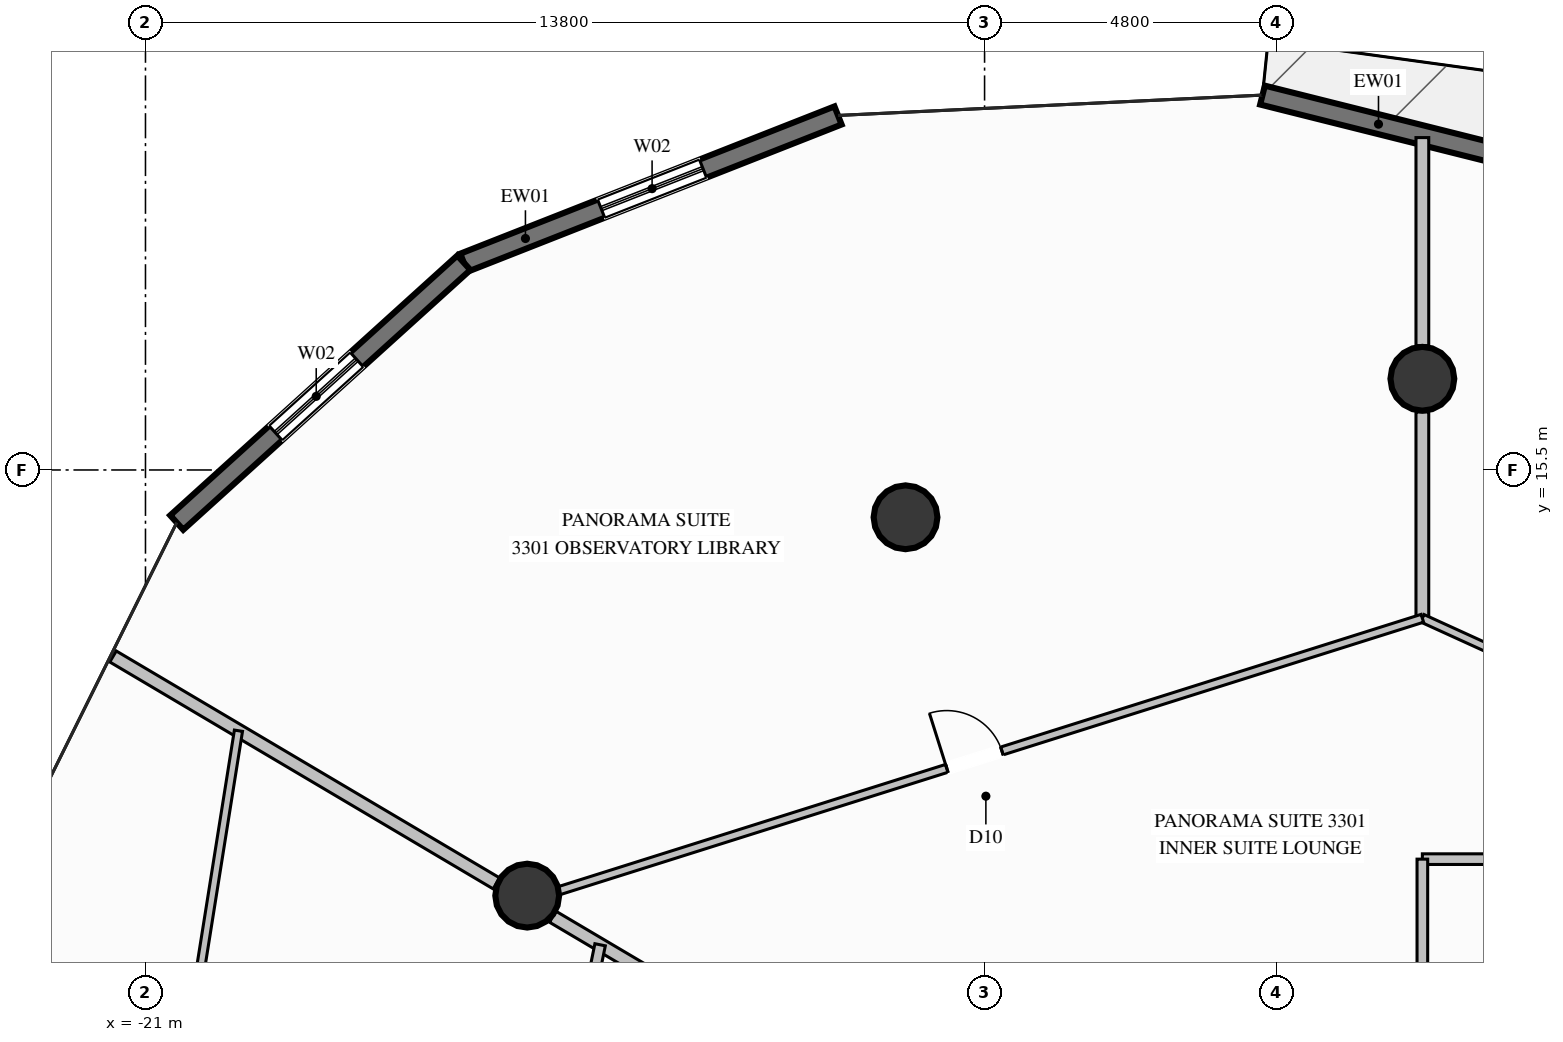
"""IFC4 building model, lengths in metres.
Left out: names, types, materials, properties, quantities, classifications, styles, units other than length and angle.
Written with IfcOpenShell. Run it as: python <this file> out.ifc"""

import sys

from ifc_helpers import new_model, si_unit, direction, frame, frame_2d, origin, origin_2d, place, context, subcontext, project, spatial, rectangle, circle, extrude, element, fill, save


model = new_model("IFC4")
c1 = context("Model", 3, precision=1e-05, world=origin(), true_north=direction((0.0, 1.0)))
c2 = subcontext(c1, "Body", "Model", "MODEL_VIEW")
j1 = project(units=[si_unit("LENGTHUNIT", "METRE"), si_unit("PLANEANGLEUNIT", "RADIAN")], contexts=[c1])
p1 = place(None, origin())
s1 = spatial("IfcSite", under=j1, at=p1, CompositionType="ELEMENT")
p2 = place(p1, origin())
s2 = spatial("IfcBuilding", under=s1, at=p2, CompositionType="ELEMENT")
p3 = place(p2, frame((0.0, 0.0, 124.2)))
s3 = spatial("IfcBuildingStorey", under=s2, at=p3, CompositionType="ELEMENT", Elevation=124.2)
for number, where, z_axis, x_axis in (
    (1, (0.0, 17.0, 0.0), (0.0, 0.0, 1.0), (1.0, 0.0, 0.0)),
    (2, (-8.5, 14.722, 0.0), (0.0, 0.0, 1.0), (1.0, 0.0, 0.0)),
    (3, (-14.722, 8.5, 0.0), (0.0, 0.0, 1.0), (1.0, 0.0, 0.0)),
):
    element("IfcColumn", number, at=place(p3, frame(where, z_axis=z_axis, x_axis=x_axis)), inside=s3, PredefinedType="COLUMN", context=c2, shape_type="SweptSolid", body=[
        extrude(circle(Radius=0.525, at=origin_2d()), origin(), (0.0, 0.0, 1.0), 3.6),
    ])
p4 = place(p3, frame((-2.629, 21.665, 0.0), z_axis=(0.0, 0.0, 1.0), x_axis=(0.969993748762, -0.243129856994, 0.0)))
e4 = element("IfcWall", 4, at=p4, inside=s3, PredefinedType="SOLIDWALL", context=c2, shape_type="SweptSolid", body=[
    extrude(rectangle(XDim=7.346, YDim=0.32, at=frame_2d((3.673, 0.0))), origin(), (0.0, 0.0, 1.0), 3.35),
])
p5 = place(p4, frame((4.183, 0.0, 0.35)))
e5 = element("IfcOpeningElement", 5, at=p5, cuts=e4, PredefinedType="OPENING", context=c2, shape_type="SweptSolid", body=[
    extrude(rectangle(XDim=1.8, YDim=2.6, at=frame_2d((0.9, 1.3))), frame((0.0, 0.17, 0.0), z_axis=(0.0, -1.0, 0.0), x_axis=(1.0, 0.0, 0.0)), (0.0, 0.0, 1.0), 0.34),
])
p6 = place(p3, frame((-15.764, 18.908, 0.0), z_axis=(0.0, 0.0, 1.0), x_axis=(0.930517076524, 0.366248508934, 0.0)))
e6 = element("IfcWall", 6, at=p6, inside=s3, PredefinedType="SOLIDWALL", context=c2, shape_type="SweptSolid", body=[
    extrude(rectangle(XDim=6.613, YDim=0.32, at=frame_2d((3.307, 0.0))), origin(), (0.0, 0.0, 1.0), 3.35),
])
p7 = place(p6, frame((2.427, 0.0, 0.35)))
e7 = element("IfcOpeningElement", 7, at=p7, cuts=e6, PredefinedType="OPENING", context=c2, shape_type="SweptSolid", body=[
    extrude(rectangle(XDim=1.8, YDim=2.6, at=frame_2d((0.9, 1.3))), frame((0.0, 0.17, 0.0), z_axis=(0.0, -1.0, 0.0), x_axis=(1.0, 0.0, 0.0)), (0.0, 0.0, 1.0), 0.34),
])
p8 = place(p3, frame((-20.486, 14.635, 0.0), z_axis=(0.0, 0.0, 1.0), x_axis=(0.741495816543, 0.670957490494, 0.0)))
e8 = element("IfcWall", 8, at=p8, inside=s3, PredefinedType="SOLIDWALL", context=c2, shape_type="SweptSolid", body=[
    extrude(rectangle(XDim=6.368, YDim=0.32, at=frame_2d((3.184, 0.0))), origin(), (0.0, 0.0, 1.0), 3.35),
])
p9 = place(p8, frame((2.194, 0.0, 0.35)))
e9 = element("IfcOpeningElement", 9, at=p9, cuts=e8, PredefinedType="OPENING", context=c2, shape_type="SweptSolid", body=[
    extrude(rectangle(XDim=1.8, YDim=2.6, at=frame_2d((0.9, 1.3))), frame((0.0, 0.17, 0.0), z_axis=(0.0, -1.0, 0.0), x_axis=(1.0, 0.0, 0.0)), (0.0, 0.0, 1.0), 0.34),
])
p10 = place(p3, frame((-9.396, 5.25, 0.0), z_axis=(0.0, 0.0, 1.0), x_axis=(-0.860613457584, 0.509258752134, 0.0)))
e10 = element("IfcWall", 10, at=p10, inside=s3, PredefinedType="PARTITIONING", context=c2, shape_type="SweptSolid", body=[
    extrude(rectangle(XDim=5.701, YDim=0.21, at=frame_2d((2.85, 0.0))), origin(), (0.0, 0.0, 1.0), 2.791),
])
p11 = place(p3, frame((-15.228, 8.701, 0.0), z_axis=(0.0, 0.0, 1.0), x_axis=(-0.860570126037, 0.509331972462, 0.0)))
e11 = element("IfcWall", 11, at=p11, inside=s3, PredefinedType="PARTITIONING", context=c2, shape_type="SweptSolid", body=[
    extrude(rectangle(XDim=7.328, YDim=0.21, at=frame_2d((3.664, 0.0))), origin(), (0.0, 0.0, 1.0), 3.35),
])
for number, where, z_axis, x_axis in (
    (12, (0.0, 9.1, 0.0), (0.0, 0.0, 1.0), (1.0, 0.0, 0.0)),
    (13, (0.0, 9.1, 0.0), (0.0, 0.0, 1.0), (0.0, -1.0, 0.0)),
):
    element("IfcWall", number, at=place(p3, frame(where, z_axis=z_axis, x_axis=x_axis)), inside=s3, PredefinedType="PLUMBINGWALL", context=c2, shape_type="SweptSolid", body=[
        extrude(rectangle(XDim=2.25, YDim=0.175, at=frame_2d((1.125, 0.0))), origin(), (0.0, 0.0, 1.0), 3.35),
    ])
p12 = place(p3, frame((0.0, 13.061, 0.0), z_axis=(0.0, 0.0, 1.0), x_axis=(0.0, 1.0, 0.0)))
e14 = element("IfcWall", 14, at=p12, inside=s3, PredefinedType="PARTITIONING", context=c2, shape_type="SweptSolid", body=[
    extrude(rectangle(XDim=3.394, YDim=0.21, at=frame_2d((1.697, 0.0))), origin(), (0.0, 0.0, 1.0), 3.35),
])
p13 = place(p3, frame((0.0, 17.545, 0.0), z_axis=(0.0, 0.0, 1.0), x_axis=(0.0, 1.0, 0.0)))
e15 = element("IfcWall", 15, at=p13, inside=s3, PredefinedType="PARTITIONING", context=c2, shape_type="SweptSolid", body=[
    extrude(rectangle(XDim=3.421, YDim=0.21, at=frame_2d((1.71, 0.0))), origin(), (0.0, 0.0, 1.0), 3.35),
])
p14 = place(p3, frame((0.0, 13.061, 0.0), z_axis=(0.0, 0.0, 1.0), x_axis=(0.909952678095, -0.414712097277, 0.0)))
e16 = element("IfcWall", 16, at=p14, inside=s3, PredefinedType="PARTITIONING", context=c2, shape_type="SweptSolid", body=[
    extrude(rectangle(XDim=13.998, YDim=0.135, at=frame_2d((6.999, 0.0))), origin(), (0.0, 0.0, 1.0), 3.35),
])
p15 = place(p14, frame((6.524, 0.0, 0.0)))
e17 = element("IfcOpeningElement", 17, at=p15, cuts=e16, PredefinedType="OPENING", context=c2, shape_type="SweptSolid", body=[
    extrude(rectangle(XDim=0.95, YDim=2.1, at=frame_2d((0.475, 1.05))), frame((0.0, 0.078, 0.0), z_axis=(0.0, -1.0, 0.0), x_axis=(1.0, 0.0, 0.0)), (0.0, 0.0, 1.0), 0.155),
])
p16 = place(p3, frame((-14.737, 8.411, 0.0), z_axis=(0.0, 0.0, 1.0), x_axis=(0.953650690157, 0.300915870573, 0.0)))
e18 = element("IfcWall", 18, at=p16, inside=s3, PredefinedType="PARTITIONING", context=c2, shape_type="SweptSolid", body=[
    extrude(rectangle(XDim=15.453, YDim=0.135, at=frame_2d((7.727, 0.0))), origin(), (0.0, 0.0, 1.0), 2.879),
])
p17 = place(p16, frame((7.252, 0.0, 0.0)))
e19 = element("IfcOpeningElement", 19, at=p17, cuts=e18, PredefinedType="OPENING", context=c2, shape_type="SweptSolid", body=[
    extrude(rectangle(XDim=0.95, YDim=2.1, at=frame_2d((0.475, 1.05))), frame((0.0, 0.078, 0.0), z_axis=(0.0, -1.0, 0.0), x_axis=(1.0, 0.0, 0.0)), (0.0, 0.0, 1.0), 0.155),
])
p18 = place(p3, frame((-13.523, 7.692, 0.0), z_axis=(0.0, 0.0, 1.0), x_axis=(-0.200303741318, -0.979733847131, 0.0)))
e20 = element("IfcWall", 20, at=p18, inside=s3, PredefinedType="PLUMBINGWALL", context=c2, shape_type="SweptSolid", body=[
    extrude(rectangle(XDim=3.34, YDim=0.175, at=frame_2d((1.67, 0.0))), origin(), (0.0, 0.0, 1.0), 3.35),
])
p19 = place(p3, frame((-19.471, 11.212, 0.0), z_axis=(0.0, 0.0, 1.0), x_axis=(-0.157304320927, -0.987550176253, 0.0)))
e21 = element("IfcWall", 21, at=p19, inside=s3, PredefinedType="PARTITIONING", context=c2, shape_type="SweptSolid", body=[
    extrude(rectangle(XDim=11.379, YDim=0.135, at=frame_2d((5.69, 0.0))), origin(), (0.0, 0.0, 1.0), 3.35),
])
p20 = place(p19, frame((5.215, 0.0, 0.0)))
e22 = element("IfcOpeningElement", 22, at=p20, cuts=e21, PredefinedType="OPENING", context=c2, shape_type="SweptSolid", body=[
    extrude(rectangle(XDim=0.95, YDim=2.1, at=frame_2d((0.475, 1.05))), frame((0.0, 0.078, 0.0), z_axis=(0.0, -1.0, 0.0), x_axis=(1.0, 0.0, 0.0)), (0.0, 0.0, 1.0), 0.155),
])
p21 = place(p7, origin())
e23 = element("IfcWindow", 23, at=p21, inside=s3, PartitioningType="SINGLE_PANEL", PredefinedType="WINDOW", context=c2, shape_type="SweptSolid", body=[
    extrude(rectangle(XDim=1.8, YDim=2.6, at=frame_2d((0.9, 1.3))), frame((0.0, 0.03, 0.0), z_axis=(0.0, -1.0, 0.0), x_axis=(1.0, 0.0, 0.0)), (0.0, 0.0, 1.0), 0.06),
])
fill(e7, e23)
p22 = place(p9, origin())
e24 = element("IfcWindow", 24, at=p22, inside=s3, PartitioningType="SINGLE_PANEL", PredefinedType="WINDOW", context=c2, shape_type="SweptSolid", body=[
    extrude(rectangle(XDim=1.8, YDim=2.6, at=frame_2d((0.9, 1.3))), frame((0.0, 0.03, 0.0), z_axis=(0.0, -1.0, 0.0), x_axis=(1.0, 0.0, 0.0)), (0.0, 0.0, 1.0), 0.06),
])
fill(e9, e24)
p23 = place(p17, origin())
e25 = element("IfcDoor", 25, at=p23, inside=s3, OperationType="SINGLE_SWING_LEFT", PredefinedType="DOOR", context=c2, shape_type="SweptSolid", body=[
    extrude(rectangle(XDim=0.95, YDim=2.1, at=frame_2d((0.475, 1.05))), frame((0.0, 0.025, 0.0), z_axis=(0.0, -1.0, 0.0), x_axis=(1.0, 0.0, 0.0)), (0.0, 0.0, 1.0), 0.05),
])
fill(e19, e25)
save(model, sys.argv[1])
